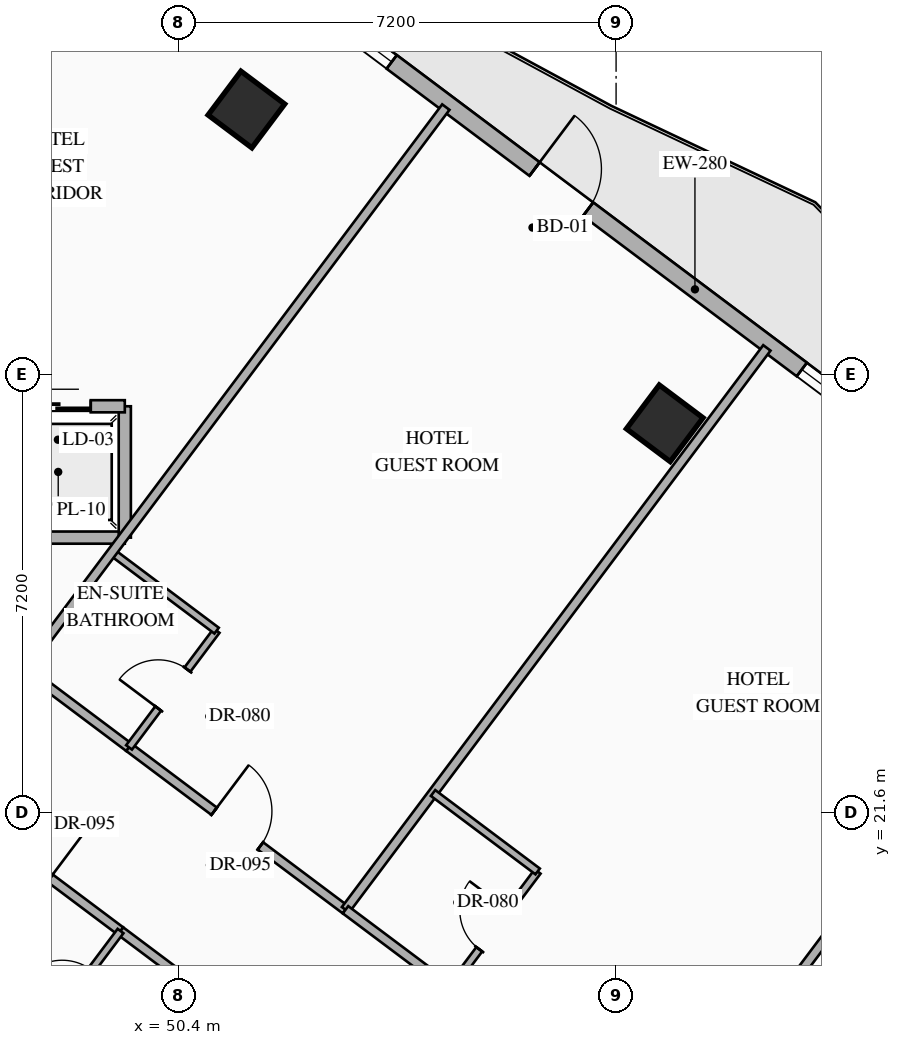
"""IFC4 building model, lengths in metres.
Left out: names, types, materials, properties, quantities, classifications, styles, units other than length and angle.
Written with IfcOpenShell. Run it as: python <this file> out.ifc"""

import sys

from ifc_helpers import new_model, si_unit, direction, frame, frame_2d, origin, origin_2d, place, context, subcontext, project, spatial, rectangle, hollow_rectangle, extrude, element, fill, save


model = new_model("IFC4")
c1 = context("Model", 3, precision=1e-05, world=origin(), true_north=direction((0.0, 1.0)))
c2 = subcontext(c1, "Body", "Model", "MODEL_VIEW")
j1 = project(units=[si_unit("LENGTHUNIT", "METRE"), si_unit("PLANEANGLEUNIT", "RADIAN")], contexts=[c1])
p1 = place(None, origin())
s1 = spatial("IfcSite", under=j1, at=p1, CompositionType="ELEMENT")
p2 = place(p1, origin())
s2 = spatial("IfcBuilding", under=s1, at=p2, CompositionType="ELEMENT")
p3 = place(p2, frame((0.0, 0.0, 84.65)))
s3 = spatial("IfcBuildingStorey", under=s2, at=p3, CompositionType="ELEMENT", Elevation=84.65)
for number, where, z_axis, x_axis in (
    (1, (51.52, 33.16, 0.0), (0.0, 0.0, 1.0), (0.8, -0.6, 0.0)),
    (2, (58.4, 28.0, 0.0), (0.0, 0.0, 1.0), (0.8, -0.6, 0.0)),
):
    element("IfcColumn", number, at=place(p3, frame(where, z_axis=z_axis, x_axis=x_axis)), inside=s3, PredefinedType="COLUMN", context=c2, shape_type="SweptSolid", body=[
        extrude(hollow_rectangle(XDim=0.9, YDim=0.9, WallThickness=0.036, at=origin_2d()), origin(), (0.0, 0.0, 1.0), 3.35),
    ])
p4 = place(p3, frame((44.86, 40.73, 0.0), z_axis=(0.0, 0.0, 1.0), x_axis=(0.800006902154, -0.599990797017, 0.0)))
e3 = element("IfcWall", 3, at=p4, inside=s3, PredefinedType="STANDARD", context=c2, shape_type="SweptSolid", body=[
    extrude(rectangle(XDim=29.712, YDim=0.28, at=frame_2d((14.856, 0.0))), origin(), (0.0, 0.0, 1.0), 3.13),
])
p5 = place(p4, frame((14.249, 0.0, 0.0)))
e4 = element("IfcOpeningElement", 4, at=p5, cuts=e3, PredefinedType="OPENING", context=c2, shape_type="SweptSolid", body=[
    extrude(rectangle(XDim=1.1, YDim=2.2, at=frame_2d((0.55, 1.1))), frame((0.0, 0.15, 0.0), z_axis=(0.0, -1.0, 0.0), x_axis=(1.0, 0.0, 0.0)), (0.0, 0.0, 1.0), 0.3),
])
p6 = place(p4, frame((1.612, 0.0, 0.85)))
e5 = element("IfcOpeningElement", 5, at=p6, cuts=e3, PredefinedType="OPENING", context=c2, shape_type="SweptSolid", body=[
    extrude(rectangle(XDim=1.4, YDim=1.8, at=frame_2d((0.7, 0.9))), frame((0.0, 0.15, 0.0), z_axis=(0.0, -1.0, 0.0), x_axis=(1.0, 0.0, 0.0)), (0.0, 0.0, 1.0), 0.3),
])
p7 = place(p4, frame((5.667, 0.0, 0.85)))
e6 = element("IfcOpeningElement", 6, at=p7, cuts=e3, PredefinedType="OPENING", context=c2, shape_type="SweptSolid", body=[
    extrude(rectangle(XDim=1.4, YDim=1.8, at=frame_2d((0.7, 0.9))), frame((0.0, 0.15, 0.0), z_axis=(0.0, -1.0, 0.0), x_axis=(1.0, 0.0, 0.0)), (0.0, 0.0, 1.0), 0.3),
])
p8 = place(p4, frame((9.912, 0.0, 0.85)))
e7 = element("IfcOpeningElement", 7, at=p8, cuts=e3, PredefinedType="OPENING", context=c2, shape_type="SweptSolid", body=[
    extrude(rectangle(XDim=1.4, YDim=1.8, at=frame_2d((0.7, 0.9))), frame((0.0, 0.15, 0.0), z_axis=(0.0, -1.0, 0.0), x_axis=(1.0, 0.0, 0.0)), (0.0, 0.0, 1.0), 0.3),
])
p9 = place(p4, frame((19.743, 0.0, 0.85)))
e8 = element("IfcOpeningElement", 8, at=p9, cuts=e3, PredefinedType="OPENING", context=c2, shape_type="SweptSolid", body=[
    extrude(rectangle(XDim=1.4, YDim=1.8, at=frame_2d((0.7, 0.9))), frame((0.0, 0.15, 0.0), z_axis=(0.0, -1.0, 0.0), x_axis=(1.0, 0.0, 0.0)), (0.0, 0.0, 1.0), 0.3),
])
p10 = place(p4, frame((22.645, 0.0, 0.85)))
e9 = element("IfcOpeningElement", 9, at=p10, cuts=e3, PredefinedType="OPENING", context=c2, shape_type="SweptSolid", body=[
    extrude(rectangle(XDim=1.4, YDim=1.8, at=frame_2d((0.7, 0.9))), frame((0.0, 0.15, 0.0), z_axis=(0.0, -1.0, 0.0), x_axis=(1.0, 0.0, 0.0)), (0.0, 0.0, 1.0), 0.3),
])
p11 = place(p4, frame((26.7, 0.0, 0.85)))
e10 = element("IfcOpeningElement", 10, at=p11, cuts=e3, PredefinedType="OPENING", context=c2, shape_type="SweptSolid", body=[
    extrude(rectangle(XDim=1.4, YDim=1.8, at=frame_2d((0.7, 0.9))), frame((0.0, 0.15, 0.0), z_axis=(0.0, -1.0, 0.0), x_axis=(1.0, 0.0, 0.0)), (0.0, 0.0, 1.0), 0.3),
])
p12 = place(p3, frame((45.12, 26.12, 0.0), z_axis=(0.0, 0.0, 1.0), x_axis=(1.0, 0.0, 0.0)))
e11 = element("IfcWall", 11, at=p12, inside=s3, PredefinedType="STANDARD", context=c2, shape_type="SweptSolid", body=[
    extrude(rectangle(XDim=4.4, YDim=0.2, at=frame_2d((2.2, 0.0))), origin(), (0.0, 0.0, 1.0), 3.13),
])
p13 = place(p3, frame((49.52, 26.12, 0.0), z_axis=(0.0, 0.0, 1.0), x_axis=(0.0, 1.0, 0.0)))
e12 = element("IfcWall", 12, at=p13, inside=s3, PredefinedType="STANDARD", context=c2, shape_type="SweptSolid", body=[
    extrude(rectangle(XDim=2.16, YDim=0.2, at=frame_2d((1.08, 0.0))), origin(), (0.0, 0.0, 1.0), 3.13),
])
p14 = place(p3, frame((45.12, 28.28, 0.0), z_axis=(0.0, 0.0, 1.0), x_axis=(1.0, 0.0, 0.0)))
e13 = element("IfcWall", 13, at=p14, inside=s3, PredefinedType="STANDARD", context=c2, shape_type="SweptSolid", body=[
    extrude(rectangle(XDim=4.4, YDim=0.2, at=frame_2d((2.2, 0.0))), origin(), (0.0, 0.0, 1.0), 3.13),
])
p15 = place(p14, frame((0.56, 0.0, 0.0)))
e14 = element("IfcOpeningElement", 14, at=p15, cuts=e13, PredefinedType="OPENING", context=c2, shape_type="SweptSolid", body=[
    extrude(rectangle(XDim=1.08, YDim=2.15, at=frame_2d((0.54, 1.075))), frame((0.0, 0.11, 0.0), z_axis=(0.0, -1.0, 0.0), x_axis=(1.0, 0.0, 0.0)), (0.0, 0.0, 1.0), 0.22),
])
p16 = place(p14, frame((2.76, 0.0, 0.0)))
e15 = element("IfcOpeningElement", 15, at=p16, cuts=e13, PredefinedType="OPENING", context=c2, shape_type="SweptSolid", body=[
    extrude(rectangle(XDim=1.08, YDim=2.15, at=frame_2d((0.54, 1.075))), frame((0.0, 0.11, 0.0), z_axis=(0.0, -1.0, 0.0), x_axis=(1.0, 0.0, 0.0)), (0.0, 0.0, 1.0), 0.22),
])
p17 = place(p3, frame((47.87, 23.96, 0.0), z_axis=(0.0, 0.0, 1.0), x_axis=(0.79998637334, -0.60001816845, 0.0)))
e16 = element("IfcWall", 16, at=p17, inside=s3, PredefinedType="PARTITIONING", context=c2, shape_type="SweptSolid", body=[
    extrude(rectangle(XDim=2.15, YDim=0.15, at=frame_2d((1.075, 0.0))), origin(), (0.0, 0.0, 1.0), 2.775),
])
p18 = place(p3, frame((49.59, 22.67, 0.0), z_axis=(0.0, 0.0, 1.0), x_axis=(0.799993416095, -0.600008778439, 0.0)))
e17 = element("IfcWall", 17, at=p18, inside=s3, PredefinedType="PARTITIONING", context=c2, shape_type="SweptSolid", body=[
    extrude(rectangle(XDim=4.45, YDim=0.15, at=frame_2d((2.225, 0.0))), origin(), (0.0, 0.0, 1.0), 2.775),
])
p19 = place(p18, frame((1.75, 0.0, 0.0)))
e18 = element("IfcOpeningElement", 18, at=p19, cuts=e17, PredefinedType="OPENING", context=c2, shape_type="SweptSolid", body=[
    extrude(rectangle(XDim=0.95, YDim=2.15, at=frame_2d((0.475, 1.075))), frame((0.0, 0.085, 0.0), z_axis=(0.0, -1.0, 0.0), x_axis=(1.0, 0.0, 0.0)), (0.0, 0.0, 1.0), 0.17),
])
p20 = place(p3, frame((49.59, 22.67, 0.0), z_axis=(0.0, 0.0, 1.0), x_axis=(0.599951172744, 0.800036618114, 0.0)))
e19 = element("IfcWall", 19, at=p20, inside=s3, PredefinedType="PARTITIONING", context=c2, shape_type="SweptSolid", body=[
    extrude(rectangle(XDim=2.4, YDim=0.12, at=frame_2d((1.2, 0.0))), origin(), (0.0, 0.0, 1.0), 3.13),
])
p21 = place(p20, frame((0.8, 0.0, 0.0)))
e20 = element("IfcOpeningElement", 20, at=p21, cuts=e19, PredefinedType="OPENING", context=c2, shape_type="SweptSolid", body=[
    extrude(rectangle(XDim=0.8, YDim=2.06, at=frame_2d((0.4, 1.03))), frame((0.0, 0.07, 0.0), z_axis=(0.0, -1.0, 0.0), x_axis=(1.0, 0.0, 0.0)), (0.0, 0.0, 1.0), 0.14),
])
p22 = place(p3, frame((49.31, 25.88, 0.0), z_axis=(0.0, 0.0, 1.0), x_axis=(0.800040880289, -0.59994548908, 0.0)))
e21 = element("IfcWall", 21, at=p22, inside=s3, PredefinedType="PARTITIONING", context=c2, shape_type="SweptSolid", body=[
    extrude(rectangle(XDim=2.15, YDim=0.12, at=frame_2d((1.075, 0.0))), origin(), (0.0, 0.0, 1.0), 3.13),
])
for number, where, z_axis, x_axis in (
    (22, (47.87, 23.96, 0.0), (0.0, 0.0, 1.0), (0.6, 0.8, 0.0)),
    (23, (53.15, 20.0, 0.0), (0.0, 0.0, 1.0), (0.6, 0.8, 0.0)),
):
    element("IfcWall", number, at=place(p3, frame(where, z_axis=z_axis, x_axis=x_axis)), inside=s3, PredefinedType="PARTITIONING", context=c2, shape_type="SweptSolid", body=[
        extrude(rectangle(XDim=11.55, YDim=0.15, at=frame_2d((5.775, 0.0))), origin(), (0.0, 0.0, 1.0), 3.13),
    ])
p23 = place(p3, frame((53.15, 20.0, 0.0), z_axis=(0.0, 0.0, 1.0), x_axis=(0.800027249606, -0.599963665473, 0.0)))
e24 = element("IfcWall", 24, at=p23, inside=s3, PredefinedType="PARTITIONING", context=c2, shape_type="SweptSolid", body=[
    extrude(rectangle(XDim=2.15, YDim=0.15, at=frame_2d((1.075, 0.0))), origin(), (0.0, 0.0, 1.0), 2.775),
])
p24 = place(p3, frame((54.87, 18.71, 0.0), z_axis=(0.0, 0.0, 1.0), x_axis=(0.6, 0.8, 0.0)))
e25 = element("IfcWall", 25, at=p24, inside=s3, PredefinedType="PARTITIONING", context=c2, shape_type="SweptSolid", body=[
    extrude(rectangle(XDim=2.4, YDim=0.12, at=frame_2d((1.2, 0.0))), origin(), (0.0, 0.0, 1.0), 3.13),
])
p25 = place(p24, frame((0.8, 0.0, 0.0)))
e26 = element("IfcOpeningElement", 26, at=p25, cuts=e25, PredefinedType="OPENING", context=c2, shape_type="SweptSolid", body=[
    extrude(rectangle(XDim=0.8, YDim=2.06, at=frame_2d((0.4, 1.03))), frame((0.0, 0.07, 0.0), z_axis=(0.0, -1.0, 0.0), x_axis=(1.0, 0.0, 0.0)), (0.0, 0.0, 1.0), 0.14),
])
p26 = place(p3, frame((54.59, 21.92, 0.0), z_axis=(0.0, 0.0, 1.0), x_axis=(0.79998637334, -0.60001816845, 0.0)))
e27 = element("IfcWall", 27, at=p26, inside=s3, PredefinedType="PARTITIONING", context=c2, shape_type="SweptSolid", body=[
    extrude(rectangle(XDim=2.15, YDim=0.12, at=frame_2d((1.075, 0.0))), origin(), (0.0, 0.0, 1.0), 3.13),
])
p27 = place(p3, frame((58.43, 16.04, 0.0), z_axis=(0.0, 0.0, 1.0), x_axis=(0.60001014597, 0.799992390422, 0.0)))
e28 = element("IfcWall", 28, at=p27, inside=s3, PredefinedType="PARTITIONING", context=c2, shape_type="SweptSolid", body=[
    extrude(rectangle(XDim=11.55, YDim=0.15, at=frame_2d((5.775, 0.0))), origin(), (0.0, 0.0, 1.0), 3.13),
])
p28 = place(p3, frame((46.37, 21.96, 0.0), z_axis=(0.0, 0.0, 1.0), x_axis=(0.799977170108, -0.600030438649, 0.0)))
e29 = element("IfcWall", 29, at=p28, inside=s3, PredefinedType="PARTITIONING", context=c2, shape_type="SweptSolid", body=[
    extrude(rectangle(XDim=3.85, YDim=0.15, at=frame_2d((1.925, 0.0))), origin(), (0.0, 0.0, 1.0), 2.425),
])
p29 = place(p28, frame((1.45, 0.0, 0.0)))
e30 = element("IfcOpeningElement", 30, at=p29, cuts=e29, PredefinedType="OPENING", context=c2, shape_type="SweptSolid", body=[
    extrude(rectangle(XDim=0.95, YDim=2.15, at=frame_2d((0.475, 1.075))), frame((0.0, 0.085, 0.0), z_axis=(0.0, -1.0, 0.0), x_axis=(1.0, 0.0, 0.0)), (0.0, 0.0, 1.0), 0.17),
])
p30 = place(p3, frame((49.45, 19.65, 0.0), z_axis=(0.0, 0.0, 1.0), x_axis=(0.800040880289, -0.59994548908, 0.0)))
e31 = element("IfcWall", 31, at=p30, inside=s3, PredefinedType="PARTITIONING", context=c2, shape_type="SweptSolid", body=[
    extrude(rectangle(XDim=2.15, YDim=0.15, at=frame_2d((1.075, 0.0))), origin(), (0.0, 0.0, 1.0), 2.425),
])
p31 = place(p3, frame((48.01, 17.73, 0.0), z_axis=(0.0, 0.0, 1.0), x_axis=(0.6, 0.8, 0.0)))
e32 = element("IfcWall", 32, at=p31, inside=s3, PredefinedType="PARTITIONING", context=c2, shape_type="SweptSolid", body=[
    extrude(rectangle(XDim=2.4, YDim=0.12, at=frame_2d((1.2, 0.0))), origin(), (0.0, 0.0, 1.0), 3.13),
])
p32 = place(p31, frame((0.8, 0.0, 0.0)))
e33 = element("IfcOpeningElement", 33, at=p32, cuts=e32, PredefinedType="OPENING", context=c2, shape_type="SweptSolid", body=[
    extrude(rectangle(XDim=0.8, YDim=2.06, at=frame_2d((0.4, 1.03))), frame((0.0, 0.07, 0.0), z_axis=(0.0, -1.0, 0.0), x_axis=(1.0, 0.0, 0.0)), (0.0, 0.0, 1.0), 0.14),
])
p33 = place(p5, origin())
e34 = element("IfcDoor", 34, at=p33, inside=s3, OperationType="SINGLE_SWING_LEFT", PredefinedType="DOOR", context=c2, shape_type="SweptSolid", body=[
    extrude(rectangle(XDim=1.1, YDim=2.2, at=frame_2d((0.55, 1.1))), frame((0.0, 0.025, 0.0), z_axis=(0.0, -1.0, 0.0), x_axis=(1.0, 0.0, 0.0)), (0.0, 0.0, 1.0), 0.05),
])
fill(e4, e34)
p34 = place(p8, origin())
e35 = element("IfcWindow", 35, at=p34, inside=s3, PartitioningType="SINGLE_PANEL", PredefinedType="WINDOW", context=c2, shape_type="SweptSolid", body=[
    extrude(rectangle(XDim=1.4, YDim=1.8, at=frame_2d((0.7, 0.9))), frame((0.0, 0.03, 0.0), z_axis=(0.0, -1.0, 0.0), x_axis=(1.0, 0.0, 0.0)), (0.0, 0.0, 1.0), 0.06),
])
fill(e7, e35)
p35 = place(p9, origin())
e36 = element("IfcWindow", 36, at=p35, inside=s3, PartitioningType="SINGLE_PANEL", PredefinedType="WINDOW", context=c2, shape_type="SweptSolid", body=[
    extrude(rectangle(XDim=1.4, YDim=1.8, at=frame_2d((0.7, 0.9))), frame((0.0, 0.03, 0.0), z_axis=(0.0, -1.0, 0.0), x_axis=(1.0, 0.0, 0.0)), (0.0, 0.0, 1.0), 0.06),
])
fill(e8, e36)
p36 = place(p16, origin())
e37 = element("IfcDoor", 37, at=p36, inside=s3, OperationType="SLIDING_TO_LEFT", PredefinedType="USERDEFINED", context=c2, shape_type="SweptSolid", body=[
    extrude(rectangle(XDim=1.08, YDim=2.15, at=frame_2d((0.54, 1.075))), frame((0.0, 0.025, 0.0), z_axis=(0.0, -1.0, 0.0), x_axis=(1.0, 0.0, 0.0)), (0.0, 0.0, 1.0), 0.05),
])
fill(e15, e37)
p37 = place(p19, origin())
e38 = element("IfcDoor", 38, at=p37, inside=s3, OperationType="SINGLE_SWING_LEFT", PredefinedType="DOOR", context=c2, shape_type="SweptSolid", body=[
    extrude(rectangle(XDim=0.95, YDim=2.15, at=frame_2d((0.475, 1.075))), frame((0.0, 0.025, 0.0), z_axis=(0.0, -1.0, 0.0), x_axis=(1.0, 0.0, 0.0)), (0.0, 0.0, 1.0), 0.05),
])
fill(e18, e38)
p38 = place(p21, origin())
e39 = element("IfcDoor", 39, at=p38, inside=s3, OperationType="SINGLE_SWING_LEFT", PredefinedType="DOOR", context=c2, shape_type="SweptSolid", body=[
    extrude(rectangle(XDim=0.8, YDim=2.06, at=frame_2d((0.4, 1.03))), frame((0.0, 0.025, 0.0), z_axis=(0.0, -1.0, 0.0), x_axis=(1.0, 0.0, 0.0)), (0.0, 0.0, 1.0), 0.05),
])
fill(e20, e39)
p39 = place(p25, origin())
e40 = element("IfcDoor", 40, at=p39, inside=s3, OperationType="SINGLE_SWING_RIGHT", PredefinedType="DOOR", context=c2, shape_type="SweptSolid", body=[
    extrude(rectangle(XDim=0.8, YDim=2.06, at=frame_2d((0.4, 1.03))), frame((0.0, 0.025, 0.0), z_axis=(0.0, -1.0, 0.0), x_axis=(1.0, 0.0, 0.0)), (0.0, 0.0, 1.0), 0.05),
])
fill(e26, e40)
save(model, sys.argv[1])
